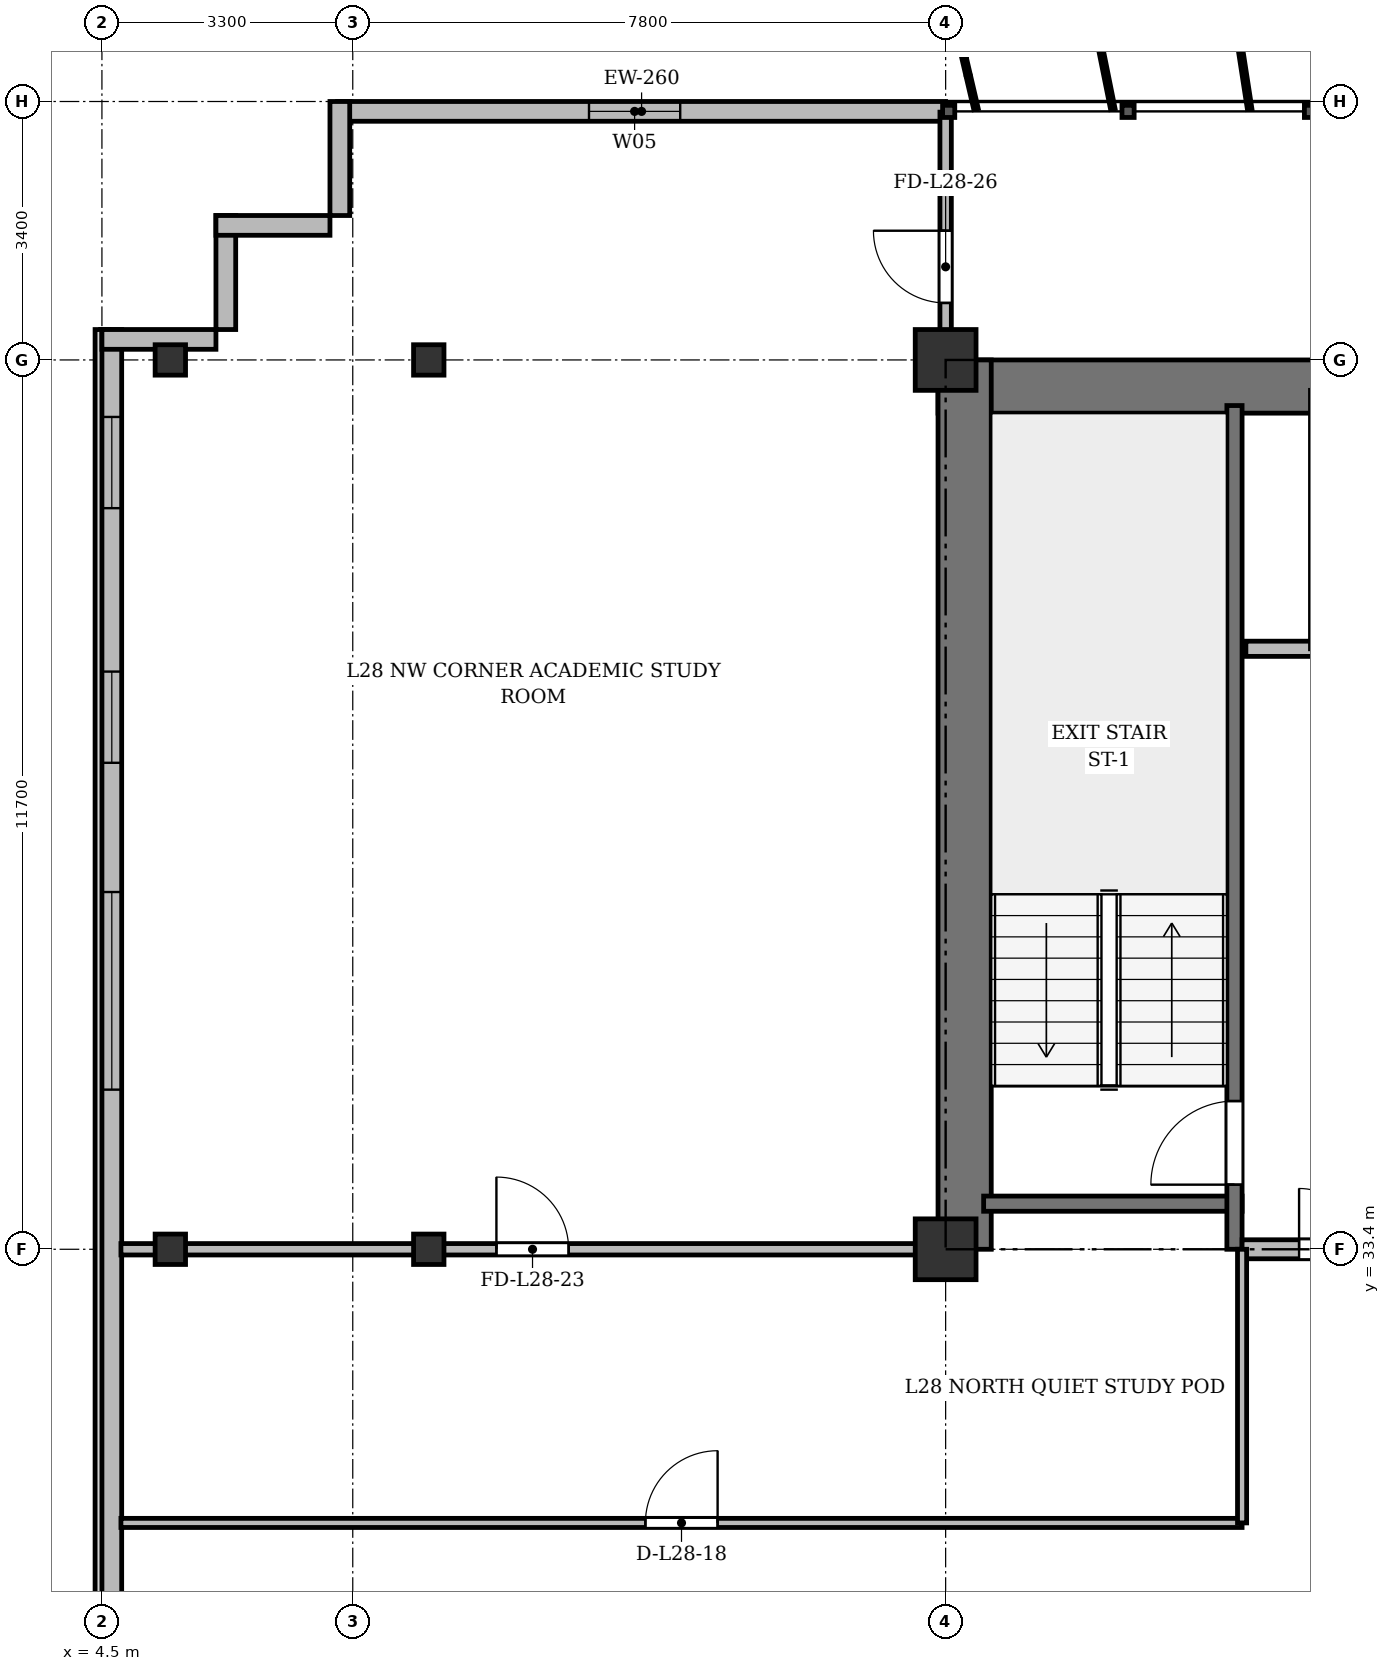
"""IFC4 building model, lengths in metres.
Left out: names, types, materials, properties, quantities, classifications, styles, units other than length and angle.
Written with IfcOpenShell. Run it as: python <this file> out.ifc"""

import sys

from ifc_helpers import new_model, si_unit, direction, frame, frame_2d, origin, origin_2d, place, context, subcontext, project, spatial, rectangle, i_section, extrude, source, transform, mapped, element, fill, save


model = new_model("IFC4")
c1 = context("Model", 3, precision=1e-05, world=origin(), true_north=direction((0.0, 1.0)))
c2 = subcontext(c1, "Body", "Model", "MODEL_VIEW")
j1 = project(units=[si_unit("LENGTHUNIT", "METRE"), si_unit("PLANEANGLEUNIT", "RADIAN")], contexts=[c1])
p1 = place(None, origin())
s1 = spatial("IfcSite", under=j1, at=p1, CompositionType="ELEMENT")
p2 = place(p1, origin())
s2 = spatial("IfcBuilding", under=s1, at=p2, CompositionType="ELEMENT")
p3 = place(p2, frame((0.0, 0.0, 110.5)))
s3 = spatial("IfcBuildingStorey", under=s2, at=p3, CompositionType="ELEMENT", Elevation=110.5)
m1 = source(origin(), c2, "Body", "SweptSolid", [
    extrude(i_section(OverallWidth=0.4, OverallDepth=0.4, WebThickness=0.022, FlangeThickness=0.035, at=origin_2d()), origin(), (0.0, 0.0, 1.0), 3.6),
])
for number, where, z_axis, x_axis in (
    (1, (5.4, 33.4, 0.0), (0.0, 0.0, 1.0), (1.0, 0.0, 0.0)),
    (2, (5.4, 45.1, 0.0), (0.0, 0.0, 1.0), (1.0, 0.0, 0.0)),
    (3, (8.8, 33.4, 0.0), (0.0, 0.0, 1.0), (1.0, 0.0, 0.0)),
    (4, (8.8, 45.1, 0.0), (0.0, 0.0, 1.0), (1.0, 0.0, 0.0)),
):
    element("IfcColumn", number, at=place(p3, frame(where, z_axis=z_axis, x_axis=x_axis)), inside=s3, PredefinedType="COLUMN", context=c2, shape_type="MappedRepresentation", body=[
        mapped(m1, transform((0.0, 0.0, 0.0), x_axis=(1.0, 0.0, 0.0), y_axis=(0.0, 1.0, 0.0), z_axis=(0.0, 0.0, 1.0), scale=1.0)),
    ])
m2 = source(origin(), c2, "Body", "SweptSolid", [
    extrude(rectangle(XDim=0.8, YDim=0.8, at=origin_2d()), origin(), (0.0, 0.0, 1.0), 3.6),
])
for number, where, z_axis, x_axis in (
    (5, (15.6, 33.4, 0.0), (0.0, 0.0, 1.0), (1.0, 0.0, 0.0)),
    (6, (15.6, 45.1, 0.0), (0.0, 0.0, 1.0), (1.0, 0.0, 0.0)),
):
    element("IfcColumn", number, at=place(p3, frame(where, z_axis=z_axis, x_axis=x_axis)), inside=s3, PredefinedType="COLUMN", context=c2, shape_type="MappedRepresentation", body=[
        mapped(m2, transform((0.0, 0.0, 0.0), x_axis=(1.0, 0.0, 0.0), y_axis=(0.0, 1.0, 0.0), z_axis=(0.0, 0.0, 1.0), scale=1.0)),
    ])
p4 = place(p3, frame((7.6, 48.37, 0.0), z_axis=(0.0, 0.0, 1.0), x_axis=(1.0, 0.0, 0.0)))
e7 = element("IfcWall", 7, at=p4, inside=s3, PredefinedType="SOLIDWALL", context=c2, shape_type="SweptSolid", body=[
    extrude(rectangle(XDim=8.0, YDim=0.26, at=frame_2d((4.0, 0.0))), origin(), (0.0, 0.0, 1.0), 3.34),
])
p5 = place(p4, frame((3.308, 0.0, 0.9)))
e8 = element("IfcOpeningElement", 8, at=p5, cuts=e7, PredefinedType="OPENING", context=c2, shape_type="SweptSolid", body=[
    extrude(rectangle(XDim=1.2, YDim=1.65, at=frame_2d((0.6, 0.825))), frame((0.0, 0.14, 0.0), z_axis=(0.0, -1.0, 0.0), x_axis=(1.0, 0.0, 0.0)), (0.0, 0.0, 1.0), 0.28),
])
p6 = place(p3, frame((4.63, 5.9, 0.0), z_axis=(0.0, 0.0, 1.0), x_axis=(0.0, 1.0, 0.0)))
e9 = element("IfcWall", 9, at=p6, inside=s3, PredefinedType="SOLIDWALL", context=c2, shape_type="SweptSolid", body=[
    extrude(rectangle(XDim=39.6, YDim=0.26, at=frame_2d((19.8, 0.0))), origin(), (0.0, 0.0, 1.0), 3.34),
])
p7 = place(p6, frame((1.45, 0.0, 0.92)))
e10 = element("IfcOpeningElement", 10, at=p7, cuts=e9, PredefinedType="OPENING", context=c2, shape_type="SweptSolid", body=[
    extrude(rectangle(XDim=1.2, YDim=1.65, at=frame_2d((0.6, 0.825))), frame((0.0, 0.14, 0.0), z_axis=(0.0, -1.0, 0.0), x_axis=(1.0, 0.0, 0.0)), (0.0, 0.0, 1.0), 0.28),
])
p8 = place(p6, frame((4.2, 0.0, 0.92)))
e11 = element("IfcOpeningElement", 11, at=p8, cuts=e9, PredefinedType="OPENING", context=c2, shape_type="SweptSolid", body=[
    extrude(rectangle(XDim=2.6, YDim=1.9, at=frame_2d((1.3, 0.95))), frame((0.0, 0.14, 0.0), z_axis=(0.0, -1.0, 0.0), x_axis=(1.0, 0.0, 0.0)), (0.0, 0.0, 1.0), 0.28),
])
p9 = place(p6, frame((8.4, 0.0, 0.92)))
e12 = element("IfcOpeningElement", 12, at=p9, cuts=e9, PredefinedType="OPENING", context=c2, shape_type="SweptSolid", body=[
    extrude(rectangle(XDim=2.6, YDim=1.9, at=frame_2d((1.3, 0.95))), frame((0.0, 0.14, 0.0), z_axis=(0.0, -1.0, 0.0), x_axis=(1.0, 0.0, 0.0)), (0.0, 0.0, 1.0), 0.28),
])
p10 = place(p6, frame((15.6, 0.0, 0.92)))
e13 = element("IfcOpeningElement", 13, at=p10, cuts=e9, PredefinedType="OPENING", context=c2, shape_type="SweptSolid", body=[
    extrude(rectangle(XDim=2.6, YDim=1.9, at=frame_2d((1.3, 0.95))), frame((0.0, 0.14, 0.0), z_axis=(0.0, -1.0, 0.0), x_axis=(1.0, 0.0, 0.0)), (0.0, 0.0, 1.0), 0.28),
])
p11 = place(p6, frame((29.6, 0.0, 0.92)))
e14 = element("IfcOpeningElement", 14, at=p11, cuts=e9, PredefinedType="OPENING", context=c2, shape_type="SweptSolid", body=[
    extrude(rectangle(XDim=2.6, YDim=1.9, at=frame_2d((1.3, 0.95))), frame((0.0, 0.14, 0.0), z_axis=(0.0, -1.0, 0.0), x_axis=(1.0, 0.0, 0.0)), (0.0, 0.0, 1.0), 0.28),
])
p12 = place(p6, frame((33.9, 0.0, 0.92)))
e15 = element("IfcOpeningElement", 15, at=p12, cuts=e9, PredefinedType="OPENING", context=c2, shape_type="SweptSolid", body=[
    extrude(rectangle(XDim=1.2, YDim=1.65, at=frame_2d((0.6, 0.825))), frame((0.0, 0.14, 0.0), z_axis=(0.0, -1.0, 0.0), x_axis=(1.0, 0.0, 0.0)), (0.0, 0.0, 1.0), 0.28),
])
p13 = place(p6, frame((37.25, 0.0, 0.92)))
e16 = element("IfcOpeningElement", 16, at=p13, cuts=e9, PredefinedType="OPENING", context=c2, shape_type="SweptSolid", body=[
    extrude(rectangle(XDim=1.2, YDim=1.65, at=frame_2d((0.6, 0.825))), frame((0.0, 0.14, 0.0), z_axis=(0.0, -1.0, 0.0), x_axis=(1.0, 0.0, 0.0)), (0.0, 0.0, 1.0), 0.28),
])
p14 = place(p3, frame((4.5, 45.37, 0.0), z_axis=(0.0, 0.0, 1.0), x_axis=(1.0, 0.0, 0.0)))
e17 = element("IfcWall", 17, at=p14, inside=s3, PredefinedType="SOLIDWALL", context=c2, shape_type="SweptSolid", body=[
    extrude(rectangle(XDim=1.5, YDim=0.26, at=frame_2d((0.75, 0.0))), origin(), (0.0, 0.0, 1.0), 2.752),
])
for number, where, z_axis, x_axis in (
    (18, (6.13, 45.5, 0.0), (0.0, 0.0, 1.0), (0.0, 1.0, 0.0)),
    (19, (6.0, 46.87, 0.0), (0.0, 0.0, 1.0), (1.0, 0.0, 0.0)),
    (20, (7.63, 47.0, 0.0), (0.0, 0.0, 1.0), (0.0, 1.0, 0.0)),
):
    element("IfcWall", number, at=place(p3, frame(where, z_axis=z_axis, x_axis=x_axis)), inside=s3, PredefinedType="SOLIDWALL", context=c2, shape_type="SweptSolid", body=[
        extrude(rectangle(XDim=1.5, YDim=0.26, at=frame_2d((0.75, 0.0))), origin(), (0.0, 0.0, 1.0), 3.34),
    ])
p15 = place(p3, frame((15.5, 44.75, 0.0), z_axis=(0.0, 0.0, 1.0), x_axis=(1.0, 0.0, 0.0)))
e21 = element("IfcWall", 21, at=p15, inside=s3, PredefinedType="SHEAR", context=c2, shape_type="SweptSolid", body=[
    extrude(rectangle(XDim=43.4, YDim=0.7, at=frame_2d((21.7, 0.0))), origin(), (0.0, 0.0, 1.0), 3.34),
])
p16 = place(p3, frame((15.85, 33.4, 0.0), z_axis=(0.0, 0.0, 1.0), x_axis=(0.0, 1.0, 0.0)))
e22 = element("IfcWall", 22, at=p16, inside=s3, PredefinedType="SHEAR", context=c2, shape_type="SweptSolid", body=[
    extrude(rectangle(XDim=11.7, YDim=0.7, at=frame_2d((5.85, 0.0))), origin(), (0.0, 0.0, 1.0), 3.34),
])
p17 = place(p3, frame((16.1, 34.0, 0.0), z_axis=(0.0, 0.0, 1.0), x_axis=(1.0, 0.0, 0.0)))
e23 = element("IfcWall", 23, at=p17, inside=s3, PredefinedType="SHEAR", context=c2, shape_type="SweptSolid", body=[
    extrude(rectangle(XDim=3.4, YDim=0.2, at=frame_2d((1.7, 0.0))), origin(), (0.0, 0.0, 1.0), 3.34),
])
p18 = place(p3, frame((19.4, 33.4, 0.0), z_axis=(0.0, 0.0, 1.0), x_axis=(0.0, 1.0, 0.0)))
e24 = element("IfcWall", 24, at=p18, inside=s3, PredefinedType="SHEAR", context=c2, shape_type="SweptSolid", body=[
    extrude(rectangle(XDim=11.1, YDim=0.2, at=frame_2d((5.55, 0.0))), origin(), (0.0, 0.0, 1.0), 3.34),
])
p19 = place(p18, frame((0.85, 0.0, 0.0)))
e25 = element("IfcOpeningElement", 25, at=p19, cuts=e24, PredefinedType="OPENING", context=c2, shape_type="SweptSolid", body=[
    extrude(rectangle(XDim=1.1, YDim=2.15, at=frame_2d((0.55, 1.075))), frame((0.0, 0.11, 0.0), z_axis=(0.0, -1.0, 0.0), x_axis=(1.0, 0.0, 0.0)), (0.0, 0.0, 1.0), 0.22),
])
p20 = place(p3, frame((19.55, 41.3, 0.0), z_axis=(0.0, 0.0, 1.0), x_axis=(1.0, 0.0, 0.0)))
e26 = element("IfcWall", 26, at=p20, inside=s3, PredefinedType="SOLIDWALL", context=c2, shape_type="SweptSolid", body=[
    extrude(rectangle(XDim=6.75, YDim=0.2, at=frame_2d((3.375, 0.0))), origin(), (0.0, 0.0, 1.0), 3.34),
])
p21 = place(p20, frame((1.7, 0.0, 0.0)))
e27 = element("IfcOpeningElement", 27, at=p21, cuts=e26, PredefinedType="OPENING", context=c2, shape_type="SweptSolid", body=[
    extrude(rectangle(XDim=1.1, YDim=2.15, at=frame_2d((0.55, 1.075))), frame((0.0, 0.11, 0.0), z_axis=(0.0, -1.0, 0.0), x_axis=(1.0, 0.0, 0.0)), (0.0, 0.0, 1.0), 0.22),
])
p22 = place(p20, frame((4.4, 0.0, 0.0)))
e28 = element("IfcOpeningElement", 28, at=p22, cuts=e26, PredefinedType="OPENING", context=c2, shape_type="SweptSolid", body=[
    extrude(rectangle(XDim=1.1, YDim=2.15, at=frame_2d((0.55, 1.075))), frame((0.0, 0.11, 0.0), z_axis=(0.0, -1.0, 0.0), x_axis=(1.0, 0.0, 0.0)), (0.0, 0.0, 1.0), 0.22),
])
p23 = place(p3, frame((19.5, 33.4, 0.0), z_axis=(0.0, 0.0, 1.0), x_axis=(1.0, 0.0, 0.0)))
e29 = element("IfcWall", 29, at=p23, inside=s3, PredefinedType="PARTITIONING", context=c2, shape_type="SweptSolid", body=[
    extrude(rectangle(XDim=6.8, YDim=0.25, at=frame_2d((3.4, 0.0))), origin(), (0.0, 0.0, 1.0), 2.752),
])
p24 = place(p23, frame((0.75, 0.0, 0.0)))
e30 = element("IfcOpeningElement", 30, at=p24, cuts=e29, PredefinedType="OPENING", context=c2, shape_type="SweptSolid", body=[
    extrude(rectangle(XDim=1.6, YDim=2.2, at=frame_2d((0.8, 1.1))), frame((0.0, 0.135, 0.0), z_axis=(0.0, -1.0, 0.0), x_axis=(1.0, 0.0, 0.0)), (0.0, 0.0, 1.0), 0.27),
])
p25 = place(p3, frame((4.75, 29.8, 0.0), z_axis=(0.0, 0.0, 1.0), x_axis=(1.0, 0.0, 0.0)))
e31 = element("IfcWall", 31, at=p25, inside=s3, PredefinedType="PARTITIONING", context=c2, shape_type="SweptSolid", body=[
    extrude(rectangle(XDim=14.75, YDim=0.12, at=frame_2d((7.375, 0.0))), origin(), (0.0, 0.0, 1.0), 2.84),
])
p26 = place(p25, frame((6.9, 0.0, 0.0)))
e32 = element("IfcOpeningElement", 32, at=p26, cuts=e31, PredefinedType="OPENING", context=c2, shape_type="SweptSolid", body=[
    extrude(rectangle(XDim=0.95, YDim=2.15, at=frame_2d((0.475, 1.075))), frame((0.0, 0.07, 0.0), z_axis=(0.0, -1.0, 0.0), x_axis=(1.0, 0.0, 0.0)), (0.0, 0.0, 1.0), 0.14),
])
p27 = place(p3, frame((19.5, 29.8, 0.0), z_axis=(0.0, 0.0, 1.0), x_axis=(0.0, 1.0, 0.0)))
e33 = element("IfcWall", 33, at=p27, inside=s3, PredefinedType="PARTITIONING", context=c2, shape_type="SweptSolid", body=[
    extrude(rectangle(XDim=3.6, YDim=0.12, at=frame_2d((1.8, 0.0))), origin(), (0.0, 0.0, 1.0), 2.752),
])
p28 = place(p3, frame((4.75, 33.4, 0.0), z_axis=(0.0, 0.0, 1.0), x_axis=(1.0, 0.0, 0.0)))
e34 = element("IfcWall", 34, at=p28, inside=s3, PredefinedType="PARTITIONING", context=c2, shape_type="SweptSolid", body=[
    extrude(rectangle(XDim=10.85, YDim=0.15, at=frame_2d((5.425, 0.0))), origin(), (0.0, 0.0, 1.0), 2.752),
])
p29 = place(p28, frame((4.94, 0.0, 0.0)))
e35 = element("IfcOpeningElement", 35, at=p29, cuts=e34, PredefinedType="OPENING", context=c2, shape_type="SweptSolid", body=[
    extrude(rectangle(XDim=0.95, YDim=2.15, at=frame_2d((0.475, 1.075))), frame((0.0, 0.085, 0.0), z_axis=(0.0, -1.0, 0.0), x_axis=(1.0, 0.0, 0.0)), (0.0, 0.0, 1.0), 0.17),
])
p30 = place(p3, frame((15.6, 44.75, 0.0), z_axis=(0.0, 0.0, 1.0), x_axis=(0.0, 1.0, 0.0)))
e36 = element("IfcWall", 36, at=p30, inside=s3, PredefinedType="PARTITIONING", context=c2, shape_type="SweptSolid", body=[
    extrude(rectangle(XDim=3.61, YDim=0.15, at=frame_2d((1.805, 0.0))), origin(), (0.0, 0.0, 1.0), 2.84),
])
p31 = place(p30, frame((1.1, 0.0, 0.0)))
e37 = element("IfcOpeningElement", 37, at=p31, cuts=e36, PredefinedType="OPENING", context=c2, shape_type="SweptSolid", body=[
    extrude(rectangle(XDim=0.95, YDim=2.15, at=frame_2d((0.475, 1.075))), frame((0.0, 0.085, 0.0), z_axis=(0.0, -1.0, 0.0), x_axis=(1.0, 0.0, 0.0)), (0.0, 0.0, 1.0), 0.17),
])
m3 = source(origin(), c2, "Body", "SweptSolid", [
    extrude(rectangle(XDim=1.2, YDim=1.65, at=frame_2d((0.6, 0.825))), frame((0.0, 0.03, 0.0), z_axis=(0.0, -1.0, 0.0), x_axis=(1.0, 0.0, 0.0)), (0.0, 0.0, 1.0), 0.06),
])
p32 = place(p5, origin())
e38 = element("IfcWindow", 38, at=p32, inside=s3, PartitioningType="SINGLE_PANEL", PredefinedType="WINDOW", context=c2, shape_type="MappedRepresentation", body=[
    mapped(m3, transform((0.0, 0.0, 0.0), x_axis=(1.0, 0.0, 0.0), y_axis=(0.0, 1.0, 0.0), z_axis=(0.0, 0.0, 1.0), scale=1.0)),
])
fill(e8, e38)
m4 = source(origin(), c2, "Body", "SweptSolid", [
    extrude(rectangle(XDim=2.6, YDim=1.9, at=frame_2d((1.3, 0.95))), frame((0.0, 0.03, 0.0), z_axis=(0.0, -1.0, 0.0), x_axis=(1.0, 0.0, 0.0)), (0.0, 0.0, 1.0), 0.06),
])
p33 = place(p11, origin())
e39 = element("IfcWindow", 39, at=p33, inside=s3, PartitioningType="SINGLE_PANEL", PredefinedType="WINDOW", context=c2, shape_type="MappedRepresentation", body=[
    mapped(m4, transform((0.0, 0.0, 0.0), x_axis=(1.0, 0.0, 0.0), y_axis=(0.0, 1.0, 0.0), z_axis=(0.0, 0.0, 1.0), scale=1.0)),
])
fill(e14, e39)
p34 = place(p12, origin())
e40 = element("IfcWindow", 40, at=p34, inside=s3, PartitioningType="SINGLE_PANEL", PredefinedType="WINDOW", context=c2, shape_type="MappedRepresentation", body=[
    mapped(m3, transform((0.0, 0.0, 0.0), x_axis=(1.0, 0.0, 0.0), y_axis=(0.0, 1.0, 0.0), z_axis=(0.0, 0.0, 1.0), scale=1.0)),
])
fill(e15, e40)
p35 = place(p13, origin())
e41 = element("IfcWindow", 41, at=p35, inside=s3, PartitioningType="SINGLE_PANEL", PredefinedType="WINDOW", context=c2, shape_type="MappedRepresentation", body=[
    mapped(m3, transform((0.0, 0.0, 0.0), x_axis=(1.0, 0.0, 0.0), y_axis=(0.0, 1.0, 0.0), z_axis=(0.0, 0.0, 1.0), scale=1.0)),
])
fill(e16, e41)
m5 = source(origin(), c2, "Body", "SweptSolid", [
    extrude(rectangle(XDim=1.1, YDim=2.15, at=frame_2d((0.55, 1.075))), frame((0.0, 0.025, 0.0), z_axis=(0.0, -1.0, 0.0), x_axis=(1.0, 0.0, 0.0)), (0.0, 0.0, 1.0), 0.05),
])
p36 = place(p19, origin())
e42 = element("IfcDoor", 42, at=p36, inside=s3, OperationType="SINGLE_SWING_LEFT", PredefinedType="DOOR", context=c2, shape_type="MappedRepresentation", body=[
    mapped(m5, transform((0.0, 0.0, 0.0), x_axis=(1.0, 0.0, 0.0), y_axis=(0.0, 1.0, 0.0), z_axis=(0.0, 0.0, 1.0), scale=1.0)),
])
fill(e25, e42)
m6 = source(origin(), c2, "Body", "SweptSolid", [
    extrude(rectangle(XDim=1.6, YDim=2.2, at=frame_2d((0.8, 1.1))), frame((0.0, 0.025, 0.0), z_axis=(0.0, -1.0, 0.0), x_axis=(1.0, 0.0, 0.0)), (0.0, 0.0, 1.0), 0.05),
])
p37 = place(p24, origin())
e43 = element("IfcDoor", 43, at=p37, inside=s3, OperationType="DOUBLE_DOOR_SINGLE_SWING", PredefinedType="DOOR", context=c2, shape_type="MappedRepresentation", body=[
    mapped(m6, transform((0.0, 0.0, 0.0), x_axis=(1.0, 0.0, 0.0), y_axis=(0.0, 1.0, 0.0), z_axis=(0.0, 0.0, 1.0), scale=1.0)),
])
fill(e30, e43)
m7 = source(origin(), c2, "Body", "SweptSolid", [
    extrude(rectangle(XDim=0.95, YDim=2.15, at=frame_2d((0.475, 1.075))), frame((0.0, 0.025, 0.0), z_axis=(0.0, -1.0, 0.0), x_axis=(1.0, 0.0, 0.0)), (0.0, 0.0, 1.0), 0.05),
])
p38 = place(p26, origin())
e44 = element("IfcDoor", 44, at=p38, inside=s3, OperationType="SINGLE_SWING_RIGHT", PredefinedType="DOOR", context=c2, shape_type="MappedRepresentation", body=[
    mapped(m7, transform((0.0, 0.0, 0.0), x_axis=(1.0, 0.0, 0.0), y_axis=(0.0, 1.0, 0.0), z_axis=(0.0, 0.0, 1.0), scale=1.0)),
])
fill(e32, e44)
p39 = place(p29, origin())
e45 = element("IfcDoor", 45, at=p39, inside=s3, OperationType="SINGLE_SWING_LEFT", PredefinedType="DOOR", context=c2, shape_type="MappedRepresentation", body=[
    mapped(m7, transform((0.0, 0.0, 0.0), x_axis=(1.0, 0.0, 0.0), y_axis=(0.0, 1.0, 0.0), z_axis=(0.0, 0.0, 1.0), scale=1.0)),
])
fill(e35, e45)
p40 = place(p31, origin())
e46 = element("IfcDoor", 46, at=p40, inside=s3, OperationType="SINGLE_SWING_RIGHT", PredefinedType="DOOR", context=c2, shape_type="MappedRepresentation", body=[
    mapped(m7, transform((0.0, 0.0, 0.0), x_axis=(1.0, 0.0, 0.0), y_axis=(0.0, 1.0, 0.0), z_axis=(0.0, 0.0, 1.0), scale=1.0)),
])
fill(e37, e46)
save(model, sys.argv[1])
